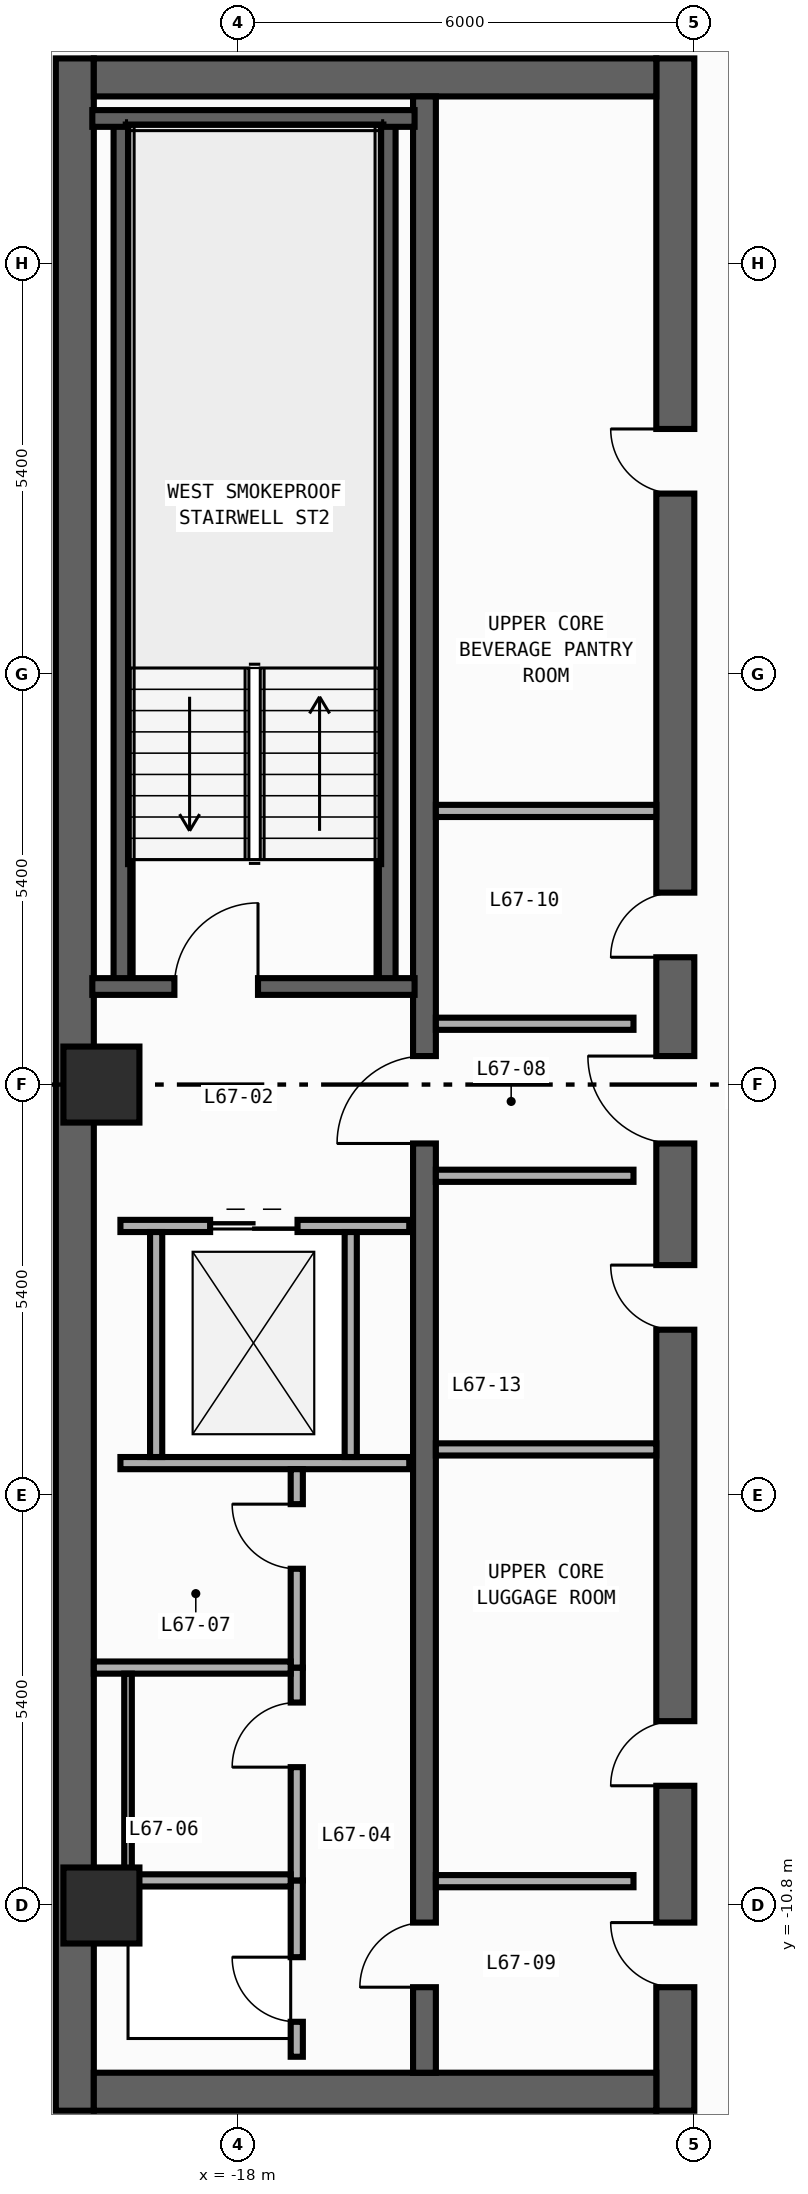
"""IFC4 building model, lengths in metres.
Left out: names, types, materials, properties, quantities, classifications, styles, units other than length and angle.
Written with IfcOpenShell. Run it as: python <this file> out.ifc"""

import sys

from ifc_helpers import new_model, si_unit, direction, frame, frame_2d, origin, origin_2d, place, context, subcontext, project, spatial, rectangle, circle, extrude, element, fill, save


model = new_model("IFC4")
c1 = context("Model", 3, precision=1e-05, world=origin(), true_north=direction((0.0, 1.0)))
c2 = subcontext(c1, "Body", "Model", "MODEL_VIEW")
j1 = project(units=[si_unit("LENGTHUNIT", "METRE"), si_unit("PLANEANGLEUNIT", "RADIAN")], contexts=[c1])
p1 = place(None, origin())
s1 = spatial("IfcSite", under=j1, at=p1, CompositionType="ELEMENT")
p2 = place(p1, origin())
s2 = spatial("IfcBuilding", under=s1, at=p2, CompositionType="ELEMENT")
p3 = place(p2, frame((0.0, 0.0, 281.4)))
s3 = spatial("IfcBuildingStorey", under=s2, at=p3, CompositionType="ELEMENT", Elevation=281.4)
p4 = place(p3, frame((-20.15, -13.5, 0.0), z_axis=(0.0, 0.0, 1.0), x_axis=(0.0, 1.0, 0.0)))
e1 = element("IfcWall", 1, at=p4, inside=s3, PredefinedType="SHEAR", context=c2, shape_type="SweptSolid", body=[
    extrude(rectangle(XDim=27.0, YDim=0.5, at=frame_2d((13.5, 0.0))), origin(), (0.0, 0.0, 1.0), 3.54),
])
p5 = place(p3, frame((-12.25, -13.5, 0.0), z_axis=(0.0, 0.0, 1.0), x_axis=(0.0, 1.0, 0.0)))
e2 = element("IfcWall", 2, at=p5, inside=s3, PredefinedType="SHEAR", context=c2, shape_type="SweptSolid", body=[
    extrude(rectangle(XDim=27.0, YDim=0.5, at=frame_2d((13.5, 0.0))), origin(), (0.0, 0.0, 1.0), 3.54),
])
p6 = place(p5, frame((15.175, 0.0, 0.0)))
e3 = element("IfcOpeningElement", 3, at=p6, cuts=e2, PredefinedType="OPENING", context=c2, shape_type="SweptSolid", body=[
    extrude(rectangle(XDim=0.85, YDim=2.1, at=frame_2d((0.425, 1.05))), frame((0.0, 0.26, 0.0), z_axis=(0.0, -1.0, 0.0), x_axis=(1.0, 0.0, 0.0)), (0.0, 0.0, 1.0), 0.52),
])
p7 = place(p5, frame((21.275, 0.0, 0.0)))
e4 = element("IfcOpeningElement", 4, at=p7, cuts=e2, PredefinedType="OPENING", context=c2, shape_type="SweptSolid", body=[
    extrude(rectangle(XDim=0.85, YDim=2.1, at=frame_2d((0.425, 1.05))), frame((0.0, 0.26, 0.0), z_axis=(0.0, -1.0, 0.0), x_axis=(1.0, 0.0, 0.0)), (0.0, 0.0, 1.0), 0.52),
])
p8 = place(p5, frame((4.275, 0.0, 0.0)))
e5 = element("IfcOpeningElement", 5, at=p8, cuts=e2, PredefinedType="OPENING", context=c2, shape_type="SweptSolid", body=[
    extrude(rectangle(XDim=0.85, YDim=2.1, at=frame_2d((0.425, 1.05))), frame((0.0, 0.26, 0.0), z_axis=(0.0, -1.0, 0.0), x_axis=(1.0, 0.0, 0.0)), (0.0, 0.0, 1.0), 0.52),
])
p9 = place(p5, frame((10.275, 0.0, 0.0)))
e6 = element("IfcOpeningElement", 6, at=p9, cuts=e2, PredefinedType="OPENING", context=c2, shape_type="SweptSolid", body=[
    extrude(rectangle(XDim=0.85, YDim=2.1, at=frame_2d((0.425, 1.05))), frame((0.0, 0.26, 0.0), z_axis=(0.0, -1.0, 0.0), x_axis=(1.0, 0.0, 0.0)), (0.0, 0.0, 1.0), 0.52),
])
p10 = place(p5, frame((12.725, 0.0, 0.0)))
e7 = element("IfcOpeningElement", 7, at=p10, cuts=e2, PredefinedType="OPENING", context=c2, shape_type="SweptSolid", body=[
    extrude(rectangle(XDim=1.15, YDim=2.2, at=frame_2d((0.575, 1.1))), frame((0.0, 0.26, 0.0), z_axis=(0.0, -1.0, 0.0), x_axis=(1.0, 0.0, 0.0)), (0.0, 0.0, 1.0), 0.52),
])
p11 = place(p5, frame((1.625, 0.0, 0.0)))
e8 = element("IfcOpeningElement", 8, at=p11, cuts=e2, PredefinedType="OPENING", context=c2, shape_type="SweptSolid", body=[
    extrude(rectangle(XDim=0.85, YDim=2.1, at=frame_2d((0.425, 1.05))), frame((0.0, 0.26, 0.0), z_axis=(0.0, -1.0, 0.0), x_axis=(1.0, 0.0, 0.0)), (0.0, 0.0, 1.0), 0.52),
])
for number, where, z_axis, x_axis in (
    (9, (-19.9, -13.25, 0.0), (0.0, 0.0, 1.0), (1.0, 0.0, 0.0)),
    (10, (-19.9, 13.25, 0.0), (0.0, 0.0, 1.0), (1.0, 0.0, 0.0)),
):
    element("IfcWall", number, at=place(p3, frame(where, z_axis=z_axis, x_axis=x_axis)), inside=s3, PredefinedType="SHEAR", context=c2, shape_type="SweptSolid", body=[
        extrude(rectangle(XDim=7.4, YDim=0.5, at=frame_2d((3.7, 0.0))), origin(), (0.0, 0.0, 1.0), 3.54),
    ])
p12 = place(p3, frame((-15.55, -13.0, 0.0), z_axis=(0.0, 0.0, 1.0), x_axis=(0.0, 1.0, 0.0)))
e11 = element("IfcWall", 11, at=p12, inside=s3, PredefinedType="SHEAR", context=c2, shape_type="SweptSolid", body=[
    extrude(rectangle(XDim=26.0, YDim=0.3, at=frame_2d((13.0, 0.0))), origin(), (0.0, 0.0, 1.0), 3.54),
])
p13 = place(p12, frame((12.225, 0.0, 0.0)))
e12 = element("IfcOpeningElement", 12, at=p13, cuts=e11, PredefinedType="OPENING", context=c2, shape_type="SweptSolid", body=[
    extrude(rectangle(XDim=1.15, YDim=2.2, at=frame_2d((0.575, 1.1))), frame((0.0, 0.16, 0.0), z_axis=(0.0, -1.0, 0.0), x_axis=(1.0, 0.0, 0.0)), (0.0, 0.0, 1.0), 0.32),
])
p14 = place(p12, frame((1.125, 0.0, 0.0)))
e13 = element("IfcOpeningElement", 13, at=p14, cuts=e11, PredefinedType="OPENING", context=c2, shape_type="SweptSolid", body=[
    extrude(rectangle(XDim=0.85, YDim=2.1, at=frame_2d((0.425, 1.05))), frame((0.0, 0.16, 0.0), z_axis=(0.0, -1.0, 0.0), x_axis=(1.0, 0.0, 0.0)), (0.0, 0.0, 1.0), 0.32),
])
for number, where, z_axis, x_axis in (
    (14, (-16.04, 1.29, 0.0), (0.0, 0.0, 1.0), (0.0, 1.0, 0.0)),
    (15, (-19.53, 1.29, 0.0), (0.0, 0.0, 1.0), (0.0, 1.0, 0.0)),
):
    element("IfcWall", number, at=place(p3, frame(where, z_axis=z_axis, x_axis=x_axis)), inside=s3, PredefinedType="SHEAR", context=c2, shape_type="SweptSolid", body=[
        extrude(rectangle(XDim=11.42, YDim=0.22, at=frame_2d((5.71, 0.0))), origin(), (0.0, 0.0, 1.0), 3.54),
    ])
p15 = place(p3, frame((-19.92, 12.71, 0.0), z_axis=(0.0, 0.0, 1.0), x_axis=(1.0, 0.0, 0.0)))
e16 = element("IfcWall", 16, at=p15, inside=s3, PredefinedType="SHEAR", context=c2, shape_type="SweptSolid", body=[
    extrude(rectangle(XDim=4.24, YDim=0.22, at=frame_2d((2.12, 0.0))), origin(), (0.0, 0.0, 1.0), 3.54),
])
p16 = place(p3, frame((-19.92, 1.29, 0.0), z_axis=(0.0, 0.0, 1.0), x_axis=(1.0, 0.0, 0.0)))
e17 = element("IfcWall", 17, at=p16, inside=s3, PredefinedType="SHEAR", context=c2, shape_type="SweptSolid", body=[
    extrude(rectangle(XDim=4.24, YDim=0.22, at=frame_2d((2.12, 0.0))), origin(), (0.0, 0.0, 1.0), 3.54),
])
p17 = place(p16, frame((1.08, 0.0, 0.0)))
e18 = element("IfcOpeningElement", 18, at=p17, cuts=e17, PredefinedType="OPENING", context=c2, shape_type="SweptSolid", body=[
    extrude(rectangle(XDim=1.1, YDim=2.2, at=frame_2d((0.55, 1.1))), frame((0.0, 0.12, 0.0), z_axis=(0.0, -1.0, 0.0), x_axis=(1.0, 0.0, 0.0)), (0.0, 0.0, 1.0), 0.24),
])
for number, where, z_axis, x_axis in (
    (19, (-19.8, -10.8, 0.0), (0.0, 0.0, 1.0), (1.0, 0.0, 0.0)),
    (20, (-19.8, 0.0, 0.0), (0.0, 0.0, 1.0), (1.0, 0.0, 0.0)),
):
    element("IfcColumn", number, at=place(p3, frame(where, z_axis=z_axis, x_axis=x_axis)), inside=s3, PredefinedType="COLUMN", context=c2, shape_type="SweptSolid", body=[
        extrude(circle(Radius=0.5, at=origin_2d()), origin(), (0.0, 0.0, 1.0), 3.8),
    ])
p18 = place(p3, frame((-19.55, -1.86, 0.0), z_axis=(0.0, 0.0, 1.0), x_axis=(1.0, 0.0, 0.0)))
e21 = element("IfcWall", 21, at=p18, inside=s3, PredefinedType="STANDARD", context=c2, shape_type="SweptSolid", body=[
    extrude(rectangle(XDim=3.8, YDim=0.16, at=frame_2d((1.9, 0.0))), origin(), (0.0, 0.0, 1.0), 3.54),
])
p19 = place(p18, frame((1.18, 0.0, 0.0)))
e22 = element("IfcOpeningElement", 22, at=p19, cuts=e21, PredefinedType="OPENING", context=c2, shape_type="SweptSolid", body=[
    extrude(rectangle(XDim=1.15, YDim=2.2, at=frame_2d((0.575, 1.1))), frame((0.0, 0.09, 0.0), z_axis=(0.0, -1.0, 0.0), x_axis=(1.0, 0.0, 0.0)), (0.0, 0.0, 1.0), 0.18),
])
p20 = place(p3, frame((-19.55, -4.98, 0.0), z_axis=(0.0, 0.0, 1.0), x_axis=(1.0, 0.0, 0.0)))
e23 = element("IfcWall", 23, at=p20, inside=s3, PredefinedType="STANDARD", context=c2, shape_type="SweptSolid", body=[
    extrude(rectangle(XDim=3.8, YDim=0.16, at=frame_2d((1.9, 0.0))), origin(), (0.0, 0.0, 1.0), 3.54),
])
for number, where, z_axis, x_axis in (
    (24, (-19.08, -4.9, 0.0), (0.0, 0.0, 1.0), (0.0, 1.0, 0.0)),
    (25, (-16.52, -4.9, 0.0), (0.0, 0.0, 1.0), (0.0, 1.0, 0.0)),
):
    element("IfcWall", number, at=place(p3, frame(where, z_axis=z_axis, x_axis=x_axis)), inside=s3, PredefinedType="STANDARD", context=c2, shape_type="SweptSolid", body=[
        extrude(rectangle(XDim=2.96, YDim=0.16, at=frame_2d((1.48, 0.0))), origin(), (0.0, 0.0, 1.0), 3.54),
    ])
for number, where, z_axis, x_axis in (
    (26, (-15.4, 0.8, 0.0), (0.0, 0.0, 1.0), (1.0, 0.0, 0.0)),
    (27, (-15.4, -1.2, 0.0), (0.0, 0.0, 1.0), (1.0, 0.0, 0.0)),
    (28, (-15.4, -10.48, 0.0), (0.0, 0.0, 1.0), (1.0, 0.0, 0.0)),
):
    element("IfcWall", number, at=place(p3, frame(where, z_axis=z_axis, x_axis=x_axis)), inside=s3, PredefinedType="STANDARD", context=c2, shape_type="SweptSolid", body=[
        extrude(rectangle(XDim=2.6, YDim=0.16, at=frame_2d((1.3, 0.0))), origin(), (0.0, 0.0, 1.0), 3.54),
    ])
p21 = place(p3, frame((-17.23, -12.79, 0.0), z_axis=(0.0, 0.0, 1.0), x_axis=(0.0, 1.0, 0.0)))
e29 = element("IfcWall", 29, at=p21, inside=s3, PredefinedType="PARTITIONING", context=c2, shape_type="SweptSolid", body=[
    extrude(rectangle(XDim=2.32, YDim=0.16, at=frame_2d((1.16, 0.0))), origin(), (0.0, 0.0, 1.0), 3.54),
])
p22 = place(p21, frame((0.46, 0.0, 0.0)))
e30 = element("IfcOpeningElement", 30, at=p22, cuts=e29, PredefinedType="OPENING", context=c2, shape_type="SweptSolid", body=[
    extrude(rectangle(XDim=0.85, YDim=2.1, at=frame_2d((0.425, 1.05))), frame((0.0, 0.09, 0.0), z_axis=(0.0, -1.0, 0.0), x_axis=(1.0, 0.0, 0.0)), (0.0, 0.0, 1.0), 0.18),
])
p23 = place(p3, frame((-17.23, -10.47, 0.0), z_axis=(0.0, 0.0, 1.0), x_axis=(0.0, 1.0, 0.0)))
e31 = element("IfcWall", 31, at=p23, inside=s3, PredefinedType="PARTITIONING", context=c2, shape_type="SweptSolid", body=[
    extrude(rectangle(XDim=2.8, YDim=0.16, at=frame_2d((1.4, 0.0))), origin(), (0.0, 0.0, 1.0), 3.54),
])
p24 = place(p23, frame((1.49, 0.0, 0.0)))
e32 = element("IfcOpeningElement", 32, at=p24, cuts=e31, PredefinedType="OPENING", context=c2, shape_type="SweptSolid", body=[
    extrude(rectangle(XDim=0.85, YDim=2.1, at=frame_2d((0.425, 1.05))), frame((0.0, 0.09, 0.0), z_axis=(0.0, -1.0, 0.0), x_axis=(1.0, 0.0, 0.0)), (0.0, 0.0, 1.0), 0.18),
])
p25 = place(p3, frame((-17.23, -7.67, 0.0), z_axis=(0.0, 0.0, 1.0), x_axis=(0.0, 1.0, 0.0)))
e33 = element("IfcWall", 33, at=p25, inside=s3, PredefinedType="PARTITIONING", context=c2, shape_type="SweptSolid", body=[
    extrude(rectangle(XDim=2.61, YDim=0.16, at=frame_2d((1.305, 0.0))), origin(), (0.0, 0.0, 1.0), 3.54),
])
p26 = place(p25, frame((1.3, 0.0, 0.0)))
e34 = element("IfcOpeningElement", 34, at=p26, cuts=e33, PredefinedType="OPENING", context=c2, shape_type="SweptSolid", body=[
    extrude(rectangle(XDim=0.85, YDim=2.1, at=frame_2d((0.425, 1.05))), frame((0.0, 0.09, 0.0), z_axis=(0.0, -1.0, 0.0), x_axis=(1.0, 0.0, 0.0)), (0.0, 0.0, 1.0), 0.18),
])
p27 = place(p3, frame((-19.75, -10.47, 0.0), z_axis=(0.0, 0.0, 1.0), x_axis=(1.0, 0.0, 0.0)))
e35 = element("IfcWall", 35, at=p27, inside=s3, PredefinedType="PARTITIONING", context=c2, shape_type="SweptSolid", body=[
    extrude(rectangle(XDim=2.44, YDim=0.16, at=frame_2d((1.22, 0.0))), origin(), (0.0, 0.0, 1.0), 3.54),
])
p28 = place(p3, frame((-19.9, -7.67, 0.0), z_axis=(0.0, 0.0, 1.0), x_axis=(1.0, 0.0, 0.0)))
e36 = element("IfcWall", 36, at=p28, inside=s3, PredefinedType="PARTITIONING", context=c2, shape_type="SweptSolid", body=[
    extrude(rectangle(XDim=2.59, YDim=0.16, at=frame_2d((1.295, 0.0))), origin(), (0.0, 0.0, 1.0), 3.54),
])
for number, where, z_axis, x_axis in (
    (37, (-15.4, 3.6, 0.0), (0.0, 0.0, 1.0), (1.0, 0.0, 0.0)),
    (38, (-15.4, -4.8, 0.0), (0.0, 0.0, 1.0), (1.0, 0.0, 0.0)),
):
    element("IfcWall", number, at=place(p3, frame(where, z_axis=z_axis, x_axis=x_axis)), inside=s3, PredefinedType="PARTITIONING", context=c2, shape_type="SweptSolid", body=[
        extrude(rectangle(XDim=2.9, YDim=0.16, at=frame_2d((1.45, 0.0))), origin(), (0.0, 0.0, 1.0), 3.54),
    ])
p29 = place(p3, frame((-19.45, -10.39, 0.0), z_axis=(0.0, 0.0, 1.0), x_axis=(0.0, 1.0, 0.0)))
e39 = element("IfcWall", 39, at=p29, inside=s3, PredefinedType="PARTITIONING", context=c2, shape_type="SweptSolid", body=[
    extrude(rectangle(XDim=2.64, YDim=0.1, at=frame_2d((1.32, 0.0))), origin(), (0.0, 0.0, 1.0), 3.54),
])
p30 = place(p17, origin())
e40 = element("IfcDoor", 40, at=p30, inside=s3, OperationType="SINGLE_SWING_RIGHT", PredefinedType="DOOR", context=c2, shape_type="SweptSolid", body=[
    extrude(rectangle(XDim=1.1, YDim=2.2, at=frame_2d((0.55, 1.1))), frame((0.0, 0.025, 0.0), z_axis=(0.0, -1.0, 0.0), x_axis=(1.0, 0.0, 0.0)), (0.0, 0.0, 1.0), 0.05),
])
fill(e18, e40)
p31 = place(p6, origin())
e41 = element("IfcDoor", 41, at=p31, inside=s3, OperationType="SINGLE_SWING_LEFT", PredefinedType="DOOR", context=c2, shape_type="SweptSolid", body=[
    extrude(rectangle(XDim=0.85, YDim=2.1, at=frame_2d((0.425, 1.05))), frame((0.0, 0.025, 0.0), z_axis=(0.0, -1.0, 0.0), x_axis=(1.0, 0.0, 0.0)), (0.0, 0.0, 1.0), 0.05),
])
fill(e3, e41)
p32 = place(p7, origin())
e42 = element("IfcDoor", 42, at=p32, inside=s3, OperationType="SINGLE_SWING_RIGHT", PredefinedType="DOOR", context=c2, shape_type="SweptSolid", body=[
    extrude(rectangle(XDim=0.85, YDim=2.1, at=frame_2d((0.425, 1.05))), frame((0.0, 0.025, 0.0), z_axis=(0.0, -1.0, 0.0), x_axis=(1.0, 0.0, 0.0)), (0.0, 0.0, 1.0), 0.05),
])
fill(e4, e42)
p33 = place(p8, origin())
e43 = element("IfcDoor", 43, at=p33, inside=s3, OperationType="SINGLE_SWING_LEFT", PredefinedType="DOOR", context=c2, shape_type="SweptSolid", body=[
    extrude(rectangle(XDim=0.85, YDim=2.1, at=frame_2d((0.425, 1.05))), frame((0.0, 0.025, 0.0), z_axis=(0.0, -1.0, 0.0), x_axis=(1.0, 0.0, 0.0)), (0.0, 0.0, 1.0), 0.05),
])
fill(e5, e43)
p34 = place(p9, origin())
e44 = element("IfcDoor", 44, at=p34, inside=s3, OperationType="SINGLE_SWING_RIGHT", PredefinedType="DOOR", context=c2, shape_type="SweptSolid", body=[
    extrude(rectangle(XDim=0.85, YDim=2.1, at=frame_2d((0.425, 1.05))), frame((0.0, 0.025, 0.0), z_axis=(0.0, -1.0, 0.0), x_axis=(1.0, 0.0, 0.0)), (0.0, 0.0, 1.0), 0.05),
])
fill(e6, e44)
p35 = place(p10, origin())
e45 = element("IfcDoor", 45, at=p35, inside=s3, OperationType="SINGLE_SWING_RIGHT", PredefinedType="DOOR", context=c2, shape_type="SweptSolid", body=[
    extrude(rectangle(XDim=1.15, YDim=2.2, at=frame_2d((0.575, 1.1))), frame((0.0, 0.025, 0.0), z_axis=(0.0, -1.0, 0.0), x_axis=(1.0, 0.0, 0.0)), (0.0, 0.0, 1.0), 0.05),
])
fill(e7, e45)
p36 = place(p13, origin())
e46 = element("IfcDoor", 46, at=p36, inside=s3, OperationType="SINGLE_SWING_LEFT", PredefinedType="DOOR", context=c2, shape_type="SweptSolid", body=[
    extrude(rectangle(XDim=1.15, YDim=2.2, at=frame_2d((0.575, 1.1))), frame((0.0, 0.025, 0.0), z_axis=(0.0, -1.0, 0.0), x_axis=(1.0, 0.0, 0.0)), (0.0, 0.0, 1.0), 0.05),
])
fill(e12, e46)
p37 = place(p11, origin())
e47 = element("IfcDoor", 47, at=p37, inside=s3, OperationType="SINGLE_SWING_RIGHT", PredefinedType="DOOR", context=c2, shape_type="SweptSolid", body=[
    extrude(rectangle(XDim=0.85, YDim=2.1, at=frame_2d((0.425, 1.05))), frame((0.0, 0.025, 0.0), z_axis=(0.0, -1.0, 0.0), x_axis=(1.0, 0.0, 0.0)), (0.0, 0.0, 1.0), 0.05),
])
fill(e8, e47)
p38 = place(p14, origin())
e48 = element("IfcDoor", 48, at=p38, inside=s3, OperationType="SINGLE_SWING_LEFT", PredefinedType="DOOR", context=c2, shape_type="SweptSolid", body=[
    extrude(rectangle(XDim=0.85, YDim=2.1, at=frame_2d((0.425, 1.05))), frame((0.0, 0.025, 0.0), z_axis=(0.0, -1.0, 0.0), x_axis=(1.0, 0.0, 0.0)), (0.0, 0.0, 1.0), 0.05),
])
fill(e13, e48)
p39 = place(p19, origin())
e49 = element("IfcDoor", 49, at=p39, inside=s3, OperationType="DOUBLE_DOOR_SLIDING", PredefinedType="DOOR", context=c2, shape_type="SweptSolid", body=[
    extrude(rectangle(XDim=1.15, YDim=2.2, at=frame_2d((0.575, 1.1))), frame((0.0, 0.025, 0.0), z_axis=(0.0, -1.0, 0.0), x_axis=(1.0, 0.0, 0.0)), (0.0, 0.0, 1.0), 0.05),
])
fill(e22, e49)
p40 = place(p22, origin())
e50 = element("IfcDoor", 50, at=p40, inside=s3, OperationType="SINGLE_SWING_RIGHT", PredefinedType="DOOR", context=c2, shape_type="SweptSolid", body=[
    extrude(rectangle(XDim=0.85, YDim=2.1, at=frame_2d((0.425, 1.05))), frame((0.0, 0.025, 0.0), z_axis=(0.0, -1.0, 0.0), x_axis=(1.0, 0.0, 0.0)), (0.0, 0.0, 1.0), 0.05),
])
fill(e30, e50)
p41 = place(p24, origin())
e51 = element("IfcDoor", 51, at=p41, inside=s3, OperationType="SINGLE_SWING_LEFT", PredefinedType="DOOR", context=c2, shape_type="SweptSolid", body=[
    extrude(rectangle(XDim=0.85, YDim=2.1, at=frame_2d((0.425, 1.05))), frame((0.0, 0.025, 0.0), z_axis=(0.0, -1.0, 0.0), x_axis=(1.0, 0.0, 0.0)), (0.0, 0.0, 1.0), 0.05),
])
fill(e32, e51)
p42 = place(p26, origin())
e52 = element("IfcDoor", 52, at=p42, inside=s3, OperationType="SINGLE_SWING_RIGHT", PredefinedType="DOOR", context=c2, shape_type="SweptSolid", body=[
    extrude(rectangle(XDim=0.85, YDim=2.1, at=frame_2d((0.425, 1.05))), frame((0.0, 0.025, 0.0), z_axis=(0.0, -1.0, 0.0), x_axis=(1.0, 0.0, 0.0)), (0.0, 0.0, 1.0), 0.05),
])
fill(e34, e52)
save(model, sys.argv[1])
